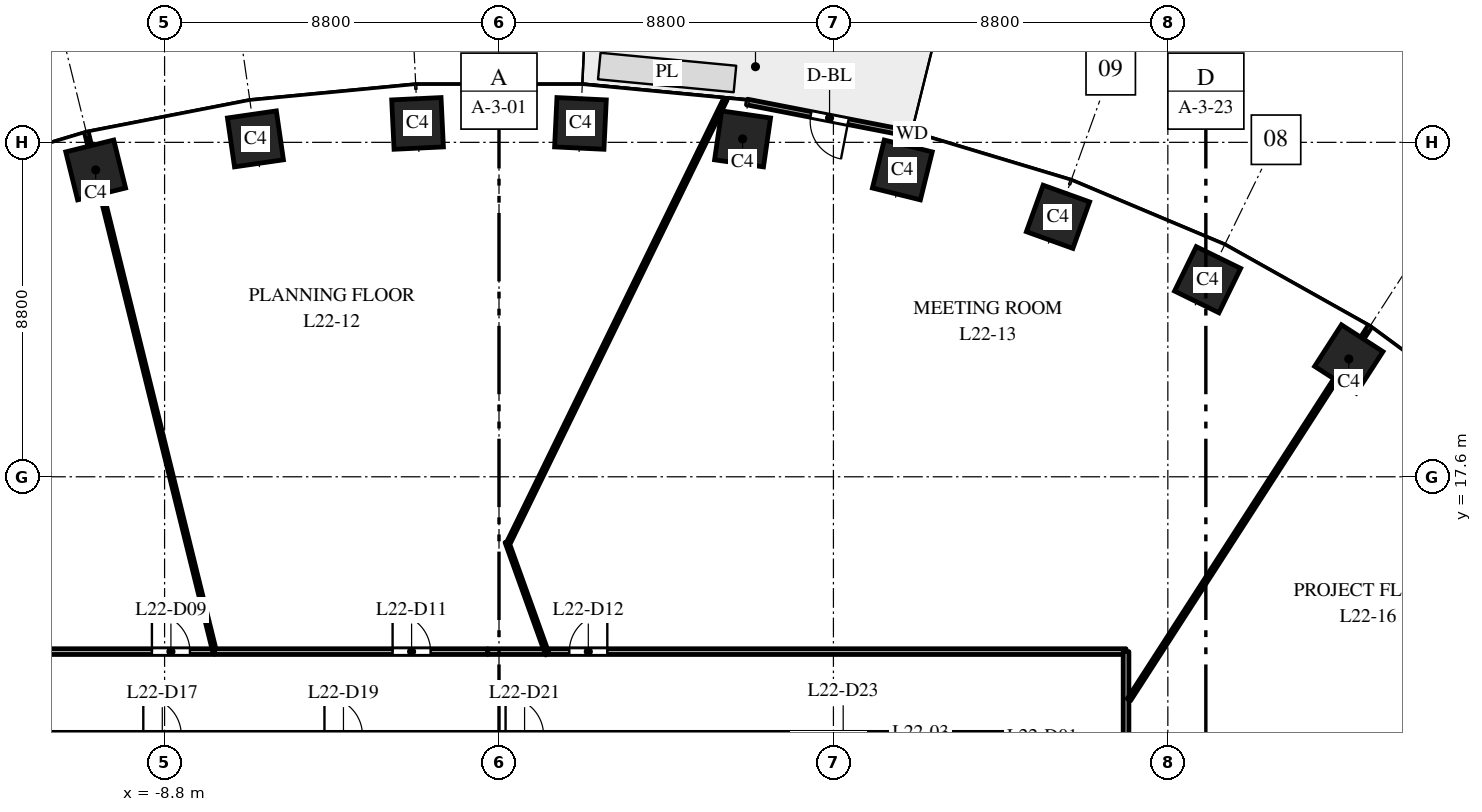
"""IFC4 building model, lengths in metres.
Left out: names, types, materials, properties, quantities, classifications, styles, units other than length and angle.
Written with IfcOpenShell. Run it as: python <this file> out.ifc"""

import sys

from ifc_helpers import new_model, si_unit, direction, frame, frame_2d, origin, origin_2d, place, context, subcontext, project, spatial, rectangle, extrude, element, fill, save


model = new_model("IFC4")
c1 = context("Model", 3, precision=1e-05, world=origin(), true_north=direction((0.0, 1.0)))
c2 = subcontext(c1, "Body", "Model", "MODEL_VIEW")
j1 = project(units=[si_unit("LENGTHUNIT", "METRE"), si_unit("PLANEANGLEUNIT", "RADIAN")], contexts=[c1])
p1 = place(None, origin())
s1 = spatial("IfcSite", under=j1, at=p1, CompositionType="ELEMENT")
p2 = place(p1, origin())
s2 = spatial("IfcBuilding", under=s1, at=p2, CompositionType="ELEMENT")
p3 = place(p2, frame((0.0, 0.0, 100.0)))
s3 = spatial("IfcBuildingStorey", under=s2, at=p3, CompositionType="ELEMENT", Elevation=100.0)
for number, where, z_axis, x_axis in (
    (1, (22.362, 20.7, 0.0), (0.0, 0.0, 1.0), (-0.84, 0.542, 0.0)),
    (2, (18.646, 22.785, 0.0), (0.0, 0.0, 1.0), (-0.898, 0.439, 0.0)),
    (3, (14.709, 24.441, 0.0), (0.0, 0.0, 1.0), (-0.941, 0.338, 0.0)),
    (4, (10.613, 25.674, 0.0), (0.0, 0.0, 1.0), (-0.971, 0.24, 0.0)),
    (5, (6.409, 26.491, 0.0), (0.0, 0.0, 1.0), (-0.99, 0.143, 0.0)),
    (6, (2.143, 26.898, 0.0), (0.0, 0.0, 1.0), (-0.999, 0.048, 0.0)),
    (7, (-2.143, 26.898, 0.0), (0.0, 0.0, 1.0), (-0.999, -0.048, 0.0)),
    (8, (-6.409, 26.491, 0.0), (0.0, 0.0, 1.0), (-0.99, -0.143, 0.0)),
    (9, (-10.613, 25.674, 0.0), (0.0, 0.0, 1.0), (-0.971, -0.24, 0.0)),
):
    element("IfcColumn", number, at=place(p3, frame(where, z_axis=z_axis, x_axis=x_axis)), inside=s3, PredefinedType="COLUMN", context=c2, shape_type="SweptSolid", body=[
        extrude(rectangle(XDim=1.3, YDim=1.3, at=origin_2d()), origin(), (0.0, 0.0, 1.0), 4.0),
    ])
p4 = place(p3, frame((10.871, 26.617, 0.0), z_axis=(0.0, 0.0, 1.0), x_axis=(-0.981631174778, 0.190788460615, 0.0)))
e10 = element("IfcWall", 10, at=p4, inside=s3, PredefinedType="STANDARD", context=c2, shape_type="SweptSolid", body=[
    extrude(rectangle(XDim=4.426, YDim=0.15, at=frame_2d((2.213, 0.0))), origin(), (0.0, 0.0, 1.0), 3.7),
])
p5 = place(p4, frame((1.713, 0.0, 0.0)))
e11 = element("IfcOpeningElement", 11, at=p5, cuts=e10, PredefinedType="OPENING", context=c2, shape_type="SweptSolid", body=[
    extrude(rectangle(XDim=1.0, YDim=2.4, at=frame_2d((0.5, 1.2))), frame((0.0, 0.085, 0.0), z_axis=(0.0, -1.0, 0.0), x_axis=(1.0, 0.0, 0.0)), (0.0, 0.0, 1.0), 0.17),
])
p6 = place(p3, frame((-16.5, 13.0, 0.0), z_axis=(0.0, 0.0, 1.0), x_axis=(1.0, 0.0, 0.0)))
e12 = element("IfcWall", 12, at=p6, inside=s3, PredefinedType="PARTITIONING", context=c2, shape_type="SweptSolid", body=[
    extrude(rectangle(XDim=9.001, YDim=0.15, at=frame_2d((4.5, 0.0))), origin(), (0.0, 0.0, 1.0), 2.85),
])
p7 = place(p6, frame((7.367, 0.0, 0.0)))
e13 = element("IfcOpeningElement", 13, at=p7, cuts=e12, PredefinedType="OPENING", context=c2, shape_type="SweptSolid", body=[
    extrude(rectangle(XDim=1.0, YDim=2.1, at=frame_2d((0.5, 1.05))), frame((0.0, 0.085, 0.0), z_axis=(0.0, -1.0, 0.0), x_axis=(1.0, 0.0, 0.0)), (0.0, 0.0, 1.0), 0.17),
])
p8 = place(p3, frame((-14.3, 10.8, 0.0), z_axis=(0.0, 0.0, 1.0), x_axis=(1.0, 0.0, 0.0)))
e14 = element("IfcWall", 14, at=p8, inside=s3, PredefinedType="PARTITIONING", context=c2, shape_type="SweptSolid", body=[
    extrude(rectangle(XDim=28.6, YDim=0.15, at=frame_2d((14.3, 0.0))), origin(), (0.0, 0.0, 1.0), 2.85),
])
p9 = place(p8, frame((4.94, 0.0, 0.0)))
e15 = element("IfcOpeningElement", 15, at=p9, cuts=e14, PredefinedType="OPENING", context=c2, shape_type="SweptSolid", body=[
    extrude(rectangle(XDim=1.0, YDim=2.1, at=frame_2d((0.5, 1.05))), frame((0.0, 0.085, 0.0), z_axis=(0.0, -1.0, 0.0), x_axis=(1.0, 0.0, 0.0)), (0.0, 0.0, 1.0), 0.17),
])
p10 = place(p8, frame((9.707, 0.0, 0.0)))
e16 = element("IfcOpeningElement", 16, at=p10, cuts=e14, PredefinedType="OPENING", context=c2, shape_type="SweptSolid", body=[
    extrude(rectangle(XDim=1.0, YDim=2.1, at=frame_2d((0.5, 1.05))), frame((0.0, 0.085, 0.0), z_axis=(0.0, -1.0, 0.0), x_axis=(1.0, 0.0, 0.0)), (0.0, 0.0, 1.0), 0.17),
])
p11 = place(p8, frame((14.473, 0.0, 0.0)))
e17 = element("IfcOpeningElement", 17, at=p11, cuts=e14, PredefinedType="OPENING", context=c2, shape_type="SweptSolid", body=[
    extrude(rectangle(XDim=1.0, YDim=2.1, at=frame_2d((0.5, 1.05))), frame((0.0, 0.085, 0.0), z_axis=(0.0, -1.0, 0.0), x_axis=(1.0, 0.0, 0.0)), (0.0, 0.0, 1.0), 0.17),
])
p12 = place(p3, frame((-10.853, 26.646, 0.0), z_axis=(0.0, 0.0, 1.0), x_axis=(0.239763745499, -0.97083126564, 0.0)))
e18 = element("IfcWall", 18, at=p12, inside=s3, PredefinedType="PARTITIONING", context=c2, shape_type="SweptSolid", body=[
    extrude(rectangle(XDim=14.056, YDim=0.1, at=frame_2d((7.028, 0.0))), origin(), (0.0, 0.0, 1.0), 2.85),
])
p13 = place(p3, frame((-7.483, 13.0, 0.0), z_axis=(0.0, 0.0, 1.0), x_axis=(1.0, 0.0, 0.0)))
e19 = element("IfcWall", 19, at=p13, inside=s3, PredefinedType="PARTITIONING", context=c2, shape_type="SweptSolid", body=[
    extrude(rectangle(XDim=7.184, YDim=0.15, at=frame_2d((3.592, 0.0))), origin(), (0.0, 0.0, 1.0), 2.85),
])
p14 = place(p13, frame((4.683, 0.0, 0.0)))
e20 = element("IfcOpeningElement", 20, at=p14, cuts=e19, PredefinedType="OPENING", context=c2, shape_type="SweptSolid", body=[
    extrude(rectangle(XDim=1.0, YDim=2.1, at=frame_2d((0.5, 1.05))), frame((0.0, 0.085, 0.0), z_axis=(0.0, -1.0, 0.0), x_axis=(1.0, 0.0, 0.0)), (0.0, 0.0, 1.0), 0.17),
])
p15 = place(p3, frame((-0.295, 13.0, 0.0), z_axis=(0.0, 0.0, 1.0), x_axis=(1.0, 0.0, 0.0)))
e21 = element("IfcWall", 21, at=p15, inside=s3, PredefinedType="PARTITIONING", context=c2, shape_type="SweptSolid", body=[
    extrude(rectangle(XDim=1.529, YDim=0.15, at=frame_2d((0.764, 0.0))), origin(), (0.0, 0.0, 1.0), 3.7),
])
p16 = place(p3, frame((0.207, 15.89, 0.0), z_axis=(0.0, 0.0, 1.0), x_axis=(0.338439213009, -0.94098825662, 0.0)))
e22 = element("IfcWall", 22, at=p16, inside=s3, PredefinedType="PARTITIONING", context=c2, shape_type="SweptSolid", body=[
    extrude(rectangle(XDim=3.147, YDim=0.1, at=frame_2d((1.573, 0.0))), origin(), (0.0, 0.0, 1.0), 3.7),
])
p17 = place(p3, frame((0.262, 15.887, 0.0), z_axis=(0.0, 0.0, 1.0), x_axis=(0.439206418019, 0.898386176636, 0.0)))
e23 = element("IfcWall", 23, at=p17, inside=s3, PredefinedType="PARTITIONING", context=c2, shape_type="SweptSolid", body=[
    extrude(rectangle(XDim=12.969, YDim=0.1, at=frame_2d((6.484, 0.0))), origin(), (0.0, 0.0, 1.0), 2.9),
])
p18 = place(p3, frame((1.299, 13.0, 0.0), z_axis=(0.0, 0.0, 1.0), x_axis=(1.0, 0.0, 0.0)))
e24 = element("IfcWall", 24, at=p18, inside=s3, PredefinedType="PARTITIONING", context=c2, shape_type="SweptSolid", body=[
    extrude(rectangle(XDim=15.201, YDim=0.15, at=frame_2d((7.601, 0.0))), origin(), (0.0, 0.0, 1.0), 2.85),
])
p19 = place(p18, frame((0.551, 0.0, 0.0)))
e25 = element("IfcOpeningElement", 25, at=p19, cuts=e24, PredefinedType="OPENING", context=c2, shape_type="SweptSolid", body=[
    extrude(rectangle(XDim=1.0, YDim=2.1, at=frame_2d((0.5, 1.05))), frame((0.0, 0.085, 0.0), z_axis=(0.0, -1.0, 0.0), x_axis=(1.0, 0.0, 0.0)), (0.0, 0.0, 1.0), 0.17),
])
p20 = place(p3, frame((16.5, 10.7, 0.0), z_axis=(0.0, 0.0, 1.0), x_axis=(0.0, 1.0, 0.0)))
e26 = element("IfcWall", 26, at=p20, inside=s3, PredefinedType="PARTITIONING", context=c2, shape_type="SweptSolid", body=[
    extrude(rectangle(XDim=2.3, YDim=0.15, at=frame_2d((1.15, 0.0))), origin(), (0.0, 0.0, 1.0), 3.7),
])
p21 = place(p3, frame((16.575, 11.733, 0.0), z_axis=(0.0, 0.0, 1.0), x_axis=(0.54222594427, 0.840232720953, 0.0)))
e27 = element("IfcWall", 27, at=p21, inside=s3, PredefinedType="PARTITIONING", context=c2, shape_type="SweptSolid", body=[
    extrude(rectangle(XDim=11.674, YDim=0.1, at=frame_2d((5.837, 0.0))), origin(), (0.0, 0.0, 1.0), 3.7),
])
p22 = place(p5, origin())
e28 = element("IfcDoor", 28, at=p22, inside=s3, OperationType="SINGLE_SWING_LEFT", PredefinedType="DOOR", context=c2, shape_type="SweptSolid", body=[
    extrude(rectangle(XDim=1.0, YDim=2.4, at=frame_2d((0.5, 1.2))), frame((0.0, 0.025, 0.0), z_axis=(0.0, -1.0, 0.0), x_axis=(1.0, 0.0, 0.0)), (0.0, 0.0, 1.0), 0.05),
])
fill(e11, e28)
p23 = place(p7, origin())
e29 = element("IfcDoor", 29, at=p23, inside=s3, OperationType="SINGLE_SWING_LEFT", PredefinedType="DOOR", context=c2, shape_type="SweptSolid", body=[
    extrude(rectangle(XDim=1.0, YDim=2.1, at=frame_2d((0.5, 1.05))), frame((0.0, 0.025, 0.0), z_axis=(0.0, -1.0, 0.0), x_axis=(1.0, 0.0, 0.0)), (0.0, 0.0, 1.0), 0.05),
])
fill(e13, e29)
p24 = place(p14, origin())
e30 = element("IfcDoor", 30, at=p24, inside=s3, OperationType="SINGLE_SWING_LEFT", PredefinedType="DOOR", context=c2, shape_type="SweptSolid", body=[
    extrude(rectangle(XDim=1.0, YDim=2.1, at=frame_2d((0.5, 1.05))), frame((0.0, 0.025, 0.0), z_axis=(0.0, -1.0, 0.0), x_axis=(1.0, 0.0, 0.0)), (0.0, 0.0, 1.0), 0.05),
])
fill(e20, e30)
p25 = place(p19, origin())
e31 = element("IfcDoor", 31, at=p25, inside=s3, OperationType="SINGLE_SWING_RIGHT", PredefinedType="DOOR", context=c2, shape_type="SweptSolid", body=[
    extrude(rectangle(XDim=1.0, YDim=2.1, at=frame_2d((0.5, 1.05))), frame((0.0, 0.025, 0.0), z_axis=(0.0, -1.0, 0.0), x_axis=(1.0, 0.0, 0.0)), (0.0, 0.0, 1.0), 0.05),
])
fill(e25, e31)
save(model, sys.argv[1])
